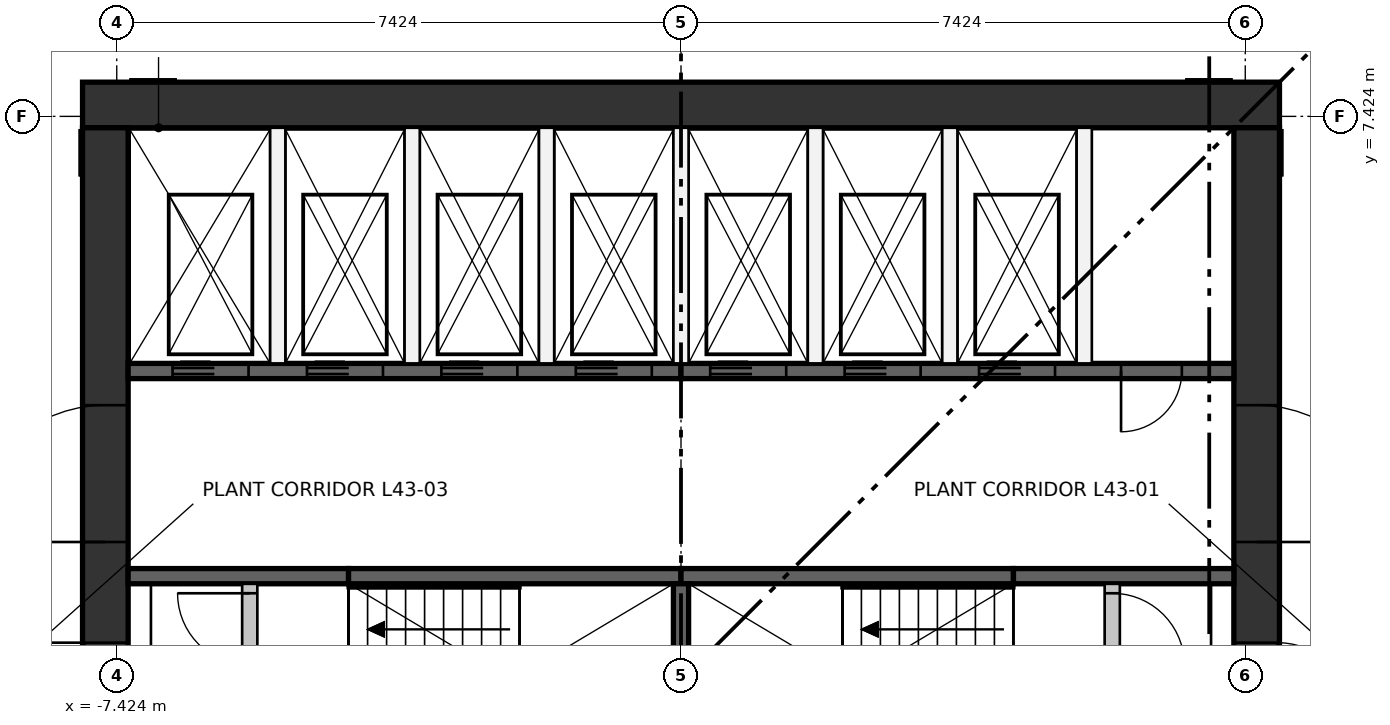
"""IFC4 building model, lengths in metres.
Left out: names, types, materials, properties, quantities, classifications, styles, units other than length and angle.
Written with IfcOpenShell. Run it as: python <this file> out.ifc"""

import sys

from ifc_helpers import new_model, si_unit, direction, frame, frame_2d, origin, place, context, subcontext, project, spatial, rectangle, extrude, element, fill, save


model = new_model("IFC4")
c1 = context("Model", 3, precision=1e-05, world=origin(), true_north=direction((0.0, 1.0)))
c2 = subcontext(c1, "Body", "Model", "MODEL_VIEW")
j1 = project(units=[si_unit("LENGTHUNIT", "METRE"), si_unit("PLANEANGLEUNIT", "RADIAN")], contexts=[c1])
p1 = place(None, origin())
s1 = spatial("IfcSite", under=j1, at=p1, CompositionType="ELEMENT")
p2 = place(p1, origin())
s2 = spatial("IfcBuilding", under=s1, at=p2, CompositionType="ELEMENT")
p3 = place(p2, frame((0.0, 0.0, 161.15)))
s3 = spatial("IfcBuildingStorey", under=s2, at=p3, CompositionType="ELEMENT", Elevation=161.15)
p4 = place(p3, frame((-7.874, 7.574, 0.0), z_axis=(0.0, 0.0, 1.0), x_axis=(1.0, 0.0, 0.0)))
e1 = element("IfcWall", 1, at=p4, inside=s3, PredefinedType="SHEAR", context=c2, shape_type="SweptSolid", body=[
    extrude(rectangle(XDim=15.748, YDim=0.6, at=frame_2d((7.874, 0.0))), origin(), (0.0, 0.0, 1.0), 6.4),
])
p5 = place(p3, frame((-7.574, -7.274, 0.0), z_axis=(0.0, 0.0, 1.0), x_axis=(0.0, 1.0, 0.0)))
e2 = element("IfcWall", 2, at=p5, inside=s3, PredefinedType="SHEAR", context=c2, shape_type="SweptSolid", body=[
    extrude(rectangle(XDim=14.548, YDim=0.6, at=frame_2d((7.274, 0.0))), origin(), (0.0, 0.0, 1.0), 6.4),
])
p6 = place(p5, frame((6.774, 0.0, 0.0)))
e3 = element("IfcOpeningElement", 3, at=p6, cuts=e2, PredefinedType="OPENING", context=c2, shape_type="SweptSolid", body=[
    extrude(rectangle(XDim=1.0, YDim=2.1, at=frame_2d((0.5, 1.05))), frame((0.0, 0.31, 0.0), z_axis=(0.0, -1.0, 0.0), x_axis=(1.0, 0.0, 0.0)), (0.0, 0.0, 1.0), 0.62),
])
p7 = place(p5, frame((3.649, 0.0, 0.0)))
e4 = element("IfcOpeningElement", 4, at=p7, cuts=e2, PredefinedType="OPENING", context=c2, shape_type="SweptSolid", body=[
    extrude(rectangle(XDim=1.8, YDim=2.1, at=frame_2d((0.9, 1.05))), frame((0.0, 0.31, 0.0), z_axis=(0.0, -1.0, 0.0), x_axis=(1.0, 0.0, 0.0)), (0.0, 0.0, 1.0), 0.62),
])
p8 = place(p5, frame((9.098, 0.0, 0.0)))
e5 = element("IfcOpeningElement", 5, at=p8, cuts=e2, PredefinedType="OPENING", context=c2, shape_type="SweptSolid", body=[
    extrude(rectangle(XDim=1.8, YDim=2.1, at=frame_2d((0.9, 1.05))), frame((0.0, 0.31, 0.0), z_axis=(0.0, -1.0, 0.0), x_axis=(1.0, 0.0, 0.0)), (0.0, 0.0, 1.0), 0.62),
])
p9 = place(p3, frame((7.574, -7.274, 0.0), z_axis=(0.0, 0.0, 1.0), x_axis=(0.0, 1.0, 0.0)))
e6 = element("IfcWall", 6, at=p9, inside=s3, PredefinedType="SHEAR", context=c2, shape_type="SweptSolid", body=[
    extrude(rectangle(XDim=14.548, YDim=0.6, at=frame_2d((7.274, 0.0))), origin(), (0.0, 0.0, 1.0), 6.4),
])
p10 = place(p9, frame((6.774, 0.0, 0.0)))
e7 = element("IfcOpeningElement", 7, at=p10, cuts=e6, PredefinedType="OPENING", context=c2, shape_type="SweptSolid", body=[
    extrude(rectangle(XDim=1.0, YDim=2.1, at=frame_2d((0.5, 1.05))), frame((0.0, 0.31, 0.0), z_axis=(0.0, -1.0, 0.0), x_axis=(1.0, 0.0, 0.0)), (0.0, 0.0, 1.0), 0.62),
])
p11 = place(p9, frame((3.649, 0.0, 0.0)))
e8 = element("IfcOpeningElement", 8, at=p11, cuts=e6, PredefinedType="OPENING", context=c2, shape_type="SweptSolid", body=[
    extrude(rectangle(XDim=1.8, YDim=2.1, at=frame_2d((0.9, 1.05))), frame((0.0, 0.31, 0.0), z_axis=(0.0, -1.0, 0.0), x_axis=(1.0, 0.0, 0.0)), (0.0, 0.0, 1.0), 0.62),
])
p12 = place(p9, frame((9.098, 0.0, 0.0)))
e9 = element("IfcOpeningElement", 9, at=p12, cuts=e6, PredefinedType="OPENING", context=c2, shape_type="SweptSolid", body=[
    extrude(rectangle(XDim=1.8, YDim=2.1, at=frame_2d((0.9, 1.05))), frame((0.0, 0.31, 0.0), z_axis=(0.0, -1.0, 0.0), x_axis=(1.0, 0.0, 0.0)), (0.0, 0.0, 1.0), 0.62),
])
p13 = place(p3, frame((-7.274, 4.074, 0.0), z_axis=(0.0, 0.0, 1.0), x_axis=(1.0, 0.0, 0.0)))
e10 = element("IfcWall", 10, at=p13, inside=s3, PredefinedType="SHEAR", context=c2, shape_type="SweptSolid", body=[
    extrude(rectangle(XDim=7.274, YDim=0.2, at=frame_2d((3.637, 0.0))), origin(), (0.0, 0.0, 1.0), 6.05),
])
p14 = place(p13, frame((0.584, 0.0, 0.0)))
e11 = element("IfcOpeningElement", 11, at=p14, cuts=e10, PredefinedType="OPENING", context=c2, shape_type="SweptSolid", body=[
    extrude(rectangle(XDim=1.0, YDim=2.1, at=frame_2d((0.5, 1.05))), frame((0.0, 0.11, 0.0), z_axis=(0.0, -1.0, 0.0), x_axis=(1.0, 0.0, 0.0)), (0.0, 0.0, 1.0), 0.22),
])
p15 = place(p13, frame((2.353, 0.0, 0.0)))
e12 = element("IfcOpeningElement", 12, at=p15, cuts=e10, PredefinedType="OPENING", context=c2, shape_type="SweptSolid", body=[
    extrude(rectangle(XDim=1.0, YDim=2.1, at=frame_2d((0.5, 1.05))), frame((0.0, 0.11, 0.0), z_axis=(0.0, -1.0, 0.0), x_axis=(1.0, 0.0, 0.0)), (0.0, 0.0, 1.0), 0.22),
])
p16 = place(p13, frame((4.121, 0.0, 0.0)))
e13 = element("IfcOpeningElement", 13, at=p16, cuts=e10, PredefinedType="OPENING", context=c2, shape_type="SweptSolid", body=[
    extrude(rectangle(XDim=1.0, YDim=2.1, at=frame_2d((0.5, 1.05))), frame((0.0, 0.11, 0.0), z_axis=(0.0, -1.0, 0.0), x_axis=(1.0, 0.0, 0.0)), (0.0, 0.0, 1.0), 0.22),
])
p17 = place(p13, frame((5.89, 0.0, 0.0)))
e14 = element("IfcOpeningElement", 14, at=p17, cuts=e10, PredefinedType="OPENING", context=c2, shape_type="SweptSolid", body=[
    extrude(rectangle(XDim=1.0, YDim=2.1, at=frame_2d((0.5, 1.05))), frame((0.0, 0.11, 0.0), z_axis=(0.0, -1.0, 0.0), x_axis=(1.0, 0.0, 0.0)), (0.0, 0.0, 1.0), 0.22),
])
p18 = place(p3, frame((0.0, 4.074, 0.0), z_axis=(0.0, 0.0, 1.0), x_axis=(1.0, 0.0, 0.0)))
e15 = element("IfcWall", 15, at=p18, inside=s3, PredefinedType="SHEAR", context=c2, shape_type="SweptSolid", body=[
    extrude(rectangle(XDim=7.274, YDim=0.2, at=frame_2d((3.637, 0.0))), origin(), (0.0, 0.0, 1.0), 6.05),
])
p19 = place(p18, frame((0.384, 0.0, 0.0)))
e16 = element("IfcOpeningElement", 16, at=p19, cuts=e15, PredefinedType="OPENING", context=c2, shape_type="SweptSolid", body=[
    extrude(rectangle(XDim=1.0, YDim=2.1, at=frame_2d((0.5, 1.05))), frame((0.0, 0.11, 0.0), z_axis=(0.0, -1.0, 0.0), x_axis=(1.0, 0.0, 0.0)), (0.0, 0.0, 1.0), 0.22),
])
p20 = place(p18, frame((2.153, 0.0, 0.0)))
e17 = element("IfcOpeningElement", 17, at=p20, cuts=e15, PredefinedType="OPENING", context=c2, shape_type="SweptSolid", body=[
    extrude(rectangle(XDim=1.0, YDim=2.1, at=frame_2d((0.5, 1.05))), frame((0.0, 0.11, 0.0), z_axis=(0.0, -1.0, 0.0), x_axis=(1.0, 0.0, 0.0)), (0.0, 0.0, 1.0), 0.22),
])
p21 = place(p18, frame((3.921, 0.0, 0.0)))
e18 = element("IfcOpeningElement", 18, at=p21, cuts=e15, PredefinedType="OPENING", context=c2, shape_type="SweptSolid", body=[
    extrude(rectangle(XDim=1.0, YDim=2.1, at=frame_2d((0.5, 1.05))), frame((0.0, 0.11, 0.0), z_axis=(0.0, -1.0, 0.0), x_axis=(1.0, 0.0, 0.0)), (0.0, 0.0, 1.0), 0.22),
])
p22 = place(p18, frame((5.79, 0.0, 0.0)))
e19 = element("IfcOpeningElement", 19, at=p22, cuts=e15, PredefinedType="OPENING", context=c2, shape_type="SweptSolid", body=[
    extrude(rectangle(XDim=0.8, YDim=2.1, at=frame_2d((0.4, 1.05))), frame((0.0, 0.11, 0.0), z_axis=(0.0, -1.0, 0.0), x_axis=(1.0, 0.0, 0.0)), (0.0, 0.0, 1.0), 0.22),
])
p23 = place(p3, frame((-7.274, 1.375, 0.0), z_axis=(0.0, 0.0, 1.0), x_axis=(1.0, 0.0, 0.0)))
e20 = element("IfcWall", 20, at=p23, inside=s3, PredefinedType="SHEAR", context=c2, shape_type="SweptSolid", body=[
    extrude(rectangle(XDim=2.9, YDim=0.2, at=frame_2d((1.45, 0.0))), origin(), (0.0, 0.0, 1.0), 6.05),
])
for number, where, z_axis, x_axis in (
    (21, (-4.374, 1.375, 0.0), (0.0, 0.0, 1.0), (1.0, 0.0, 0.0)),
    (22, (0.0, 1.375, 0.0), (0.0, 0.0, 1.0), (1.0, 0.0, 0.0)),
):
    element("IfcWall", number, at=place(p3, frame(where, z_axis=z_axis, x_axis=x_axis)), inside=s3, PredefinedType="SHEAR", context=c2, shape_type="SweptSolid", body=[
        extrude(rectangle(XDim=4.374, YDim=0.2, at=frame_2d((2.187, 0.0))), origin(), (0.0, 0.0, 1.0), 6.05),
    ])
p24 = place(p3, frame((4.374, 1.375, 0.0), z_axis=(0.0, 0.0, 1.0), x_axis=(1.0, 0.0, 0.0)))
e23 = element("IfcWall", 23, at=p24, inside=s3, PredefinedType="SHEAR", context=c2, shape_type="SweptSolid", body=[
    extrude(rectangle(XDim=2.9, YDim=0.2, at=frame_2d((1.45, 0.0))), origin(), (0.0, 0.0, 1.0), 6.05),
])
p25 = place(p3, frame((0.0, -1.275, 0.0), z_axis=(0.0, 0.0, 1.0), x_axis=(0.0, 1.0, 0.0)))
e24 = element("IfcWall", 24, at=p25, inside=s3, PredefinedType="SHEAR", context=c2, shape_type="SweptSolid", body=[
    extrude(rectangle(XDim=2.55, YDim=0.2, at=frame_2d((1.275, 0.0))), origin(), (0.0, 0.0, 1.0), 6.05),
])
for number, where, z_axis, x_axis in (
    (25, (-5.305, 4.174, 0.0), (0.0, 0.0, 1.0), (0.0, 1.0, 0.0)),
    (26, (-3.537, 4.174, 0.0), (0.0, 0.0, 1.0), (0.0, 1.0, 0.0)),
    (27, (-1.769, 4.174, 0.0), (0.0, 0.0, 1.0), (0.0, 1.0, 0.0)),
    (28, (0.0, 4.174, 0.0), (0.0, 0.0, 1.0), (0.0, 1.0, 0.0)),
    (29, (1.769, 4.174, 0.0), (0.0, 0.0, 1.0), (0.0, 1.0, 0.0)),
    (30, (3.537, 4.174, 0.0), (0.0, 0.0, 1.0), (0.0, 1.0, 0.0)),
    (31, (5.305, 4.174, 0.0), (0.0, 0.0, 1.0), (0.0, 1.0, 0.0)),
):
    element("IfcWall", number, at=place(p3, frame(where, z_axis=z_axis, x_axis=x_axis)), inside=s3, PredefinedType="PARTITIONING", context=c2, shape_type="SweptSolid", body=[
        extrude(rectangle(XDim=3.1, YDim=0.2, at=frame_2d((1.55, 0.0))), origin(), (0.0, 0.0, 1.0), 6.05),
    ])
p26 = place(p3, frame((-5.674, -1.275, 0.0), z_axis=(0.0, 0.0, 1.0), x_axis=(0.0, 1.0, 0.0)))
e32 = element("IfcWall", 32, at=p26, inside=s3, PredefinedType="PARTITIONING", context=c2, shape_type="SweptSolid", body=[
    extrude(rectangle(XDim=2.55, YDim=0.2, at=frame_2d((1.275, 0.0))), origin(), (0.0, 0.0, 1.0), 6.05),
])
p27 = place(p26, frame((0.125, 0.0, 0.0)))
e33 = element("IfcOpeningElement", 33, at=p27, cuts=e32, PredefinedType="OPENING", context=c2, shape_type="SweptSolid", body=[
    extrude(rectangle(XDim=0.95, YDim=2.1, at=frame_2d((0.475, 1.05))), frame((0.0, 0.11, 0.0), z_axis=(0.0, -1.0, 0.0), x_axis=(1.0, 0.0, 0.0)), (0.0, 0.0, 1.0), 0.22),
])
p28 = place(p26, frame((1.475, 0.0, 0.0)))
e34 = element("IfcOpeningElement", 34, at=p28, cuts=e32, PredefinedType="OPENING", context=c2, shape_type="SweptSolid", body=[
    extrude(rectangle(XDim=0.95, YDim=2.1, at=frame_2d((0.475, 1.05))), frame((0.0, 0.11, 0.0), z_axis=(0.0, -1.0, 0.0), x_axis=(1.0, 0.0, 0.0)), (0.0, 0.0, 1.0), 0.22),
])
p29 = place(p3, frame((5.674, -1.275, 0.0), z_axis=(0.0, 0.0, 1.0), x_axis=(0.0, 1.0, 0.0)))
e35 = element("IfcWall", 35, at=p29, inside=s3, PredefinedType="PARTITIONING", context=c2, shape_type="SweptSolid", body=[
    extrude(rectangle(XDim=2.55, YDim=0.2, at=frame_2d((1.275, 0.0))), origin(), (0.0, 0.0, 1.0), 6.05),
])
p30 = place(p29, frame((0.125, 0.0, 0.0)))
e36 = element("IfcOpeningElement", 36, at=p30, cuts=e35, PredefinedType="OPENING", context=c2, shape_type="SweptSolid", body=[
    extrude(rectangle(XDim=0.95, YDim=2.1, at=frame_2d((0.475, 1.05))), frame((0.0, 0.11, 0.0), z_axis=(0.0, -1.0, 0.0), x_axis=(1.0, 0.0, 0.0)), (0.0, 0.0, 1.0), 0.22),
])
p31 = place(p29, frame((1.475, 0.0, 0.0)))
e37 = element("IfcOpeningElement", 37, at=p31, cuts=e35, PredefinedType="OPENING", context=c2, shape_type="SweptSolid", body=[
    extrude(rectangle(XDim=0.95, YDim=2.1, at=frame_2d((0.475, 1.05))), frame((0.0, 0.11, 0.0), z_axis=(0.0, -1.0, 0.0), x_axis=(1.0, 0.0, 0.0)), (0.0, 0.0, 1.0), 0.22),
])
p32 = place(p14, frame((1.0, 0.0, 0.0), z_axis=(0.0, 0.0, 1.0), x_axis=(-1.0, 0.0, 0.0)))
e38 = element("IfcDoor", 38, at=p32, inside=s3, OperationType="DOUBLE_DOOR_SLIDING", PredefinedType="DOOR", context=c2, shape_type="SweptSolid", body=[
    extrude(rectangle(XDim=1.0, YDim=2.1, at=frame_2d((0.5, 1.05))), frame((0.0, 0.025, 0.0), z_axis=(0.0, -1.0, 0.0), x_axis=(1.0, 0.0, 0.0)), (0.0, 0.0, 1.0), 0.05),
])
fill(e11, e38)
p33 = place(p15, frame((1.0, 0.0, 0.0), z_axis=(0.0, 0.0, 1.0), x_axis=(-1.0, 0.0, 0.0)))
e39 = element("IfcDoor", 39, at=p33, inside=s3, OperationType="DOUBLE_DOOR_SLIDING", PredefinedType="DOOR", context=c2, shape_type="SweptSolid", body=[
    extrude(rectangle(XDim=1.0, YDim=2.1, at=frame_2d((0.5, 1.05))), frame((0.0, 0.025, 0.0), z_axis=(0.0, -1.0, 0.0), x_axis=(1.0, 0.0, 0.0)), (0.0, 0.0, 1.0), 0.05),
])
fill(e12, e39)
p34 = place(p16, frame((1.0, 0.0, 0.0), z_axis=(0.0, 0.0, 1.0), x_axis=(-1.0, 0.0, 0.0)))
e40 = element("IfcDoor", 40, at=p34, inside=s3, OperationType="DOUBLE_DOOR_SLIDING", PredefinedType="DOOR", context=c2, shape_type="SweptSolid", body=[
    extrude(rectangle(XDim=1.0, YDim=2.1, at=frame_2d((0.5, 1.05))), frame((0.0, 0.025, 0.0), z_axis=(0.0, -1.0, 0.0), x_axis=(1.0, 0.0, 0.0)), (0.0, 0.0, 1.0), 0.05),
])
fill(e13, e40)
p35 = place(p17, frame((1.0, 0.0, 0.0), z_axis=(0.0, 0.0, 1.0), x_axis=(-1.0, 0.0, 0.0)))
e41 = element("IfcDoor", 41, at=p35, inside=s3, OperationType="DOUBLE_DOOR_SLIDING", PredefinedType="DOOR", context=c2, shape_type="SweptSolid", body=[
    extrude(rectangle(XDim=1.0, YDim=2.1, at=frame_2d((0.5, 1.05))), frame((0.0, 0.025, 0.0), z_axis=(0.0, -1.0, 0.0), x_axis=(1.0, 0.0, 0.0)), (0.0, 0.0, 1.0), 0.05),
])
fill(e14, e41)
p36 = place(p19, frame((1.0, 0.0, 0.0), z_axis=(0.0, 0.0, 1.0), x_axis=(-1.0, 0.0, 0.0)))
e42 = element("IfcDoor", 42, at=p36, inside=s3, OperationType="DOUBLE_DOOR_SLIDING", PredefinedType="DOOR", context=c2, shape_type="SweptSolid", body=[
    extrude(rectangle(XDim=1.0, YDim=2.1, at=frame_2d((0.5, 1.05))), frame((0.0, 0.025, 0.0), z_axis=(0.0, -1.0, 0.0), x_axis=(1.0, 0.0, 0.0)), (0.0, 0.0, 1.0), 0.05),
])
fill(e16, e42)
p37 = place(p20, frame((1.0, 0.0, 0.0), z_axis=(0.0, 0.0, 1.0), x_axis=(-1.0, 0.0, 0.0)))
e43 = element("IfcDoor", 43, at=p37, inside=s3, OperationType="DOUBLE_DOOR_SLIDING", PredefinedType="DOOR", context=c2, shape_type="SweptSolid", body=[
    extrude(rectangle(XDim=1.0, YDim=2.1, at=frame_2d((0.5, 1.05))), frame((0.0, 0.025, 0.0), z_axis=(0.0, -1.0, 0.0), x_axis=(1.0, 0.0, 0.0)), (0.0, 0.0, 1.0), 0.05),
])
fill(e17, e43)
p38 = place(p21, frame((1.0, 0.0, 0.0), z_axis=(0.0, 0.0, 1.0), x_axis=(-1.0, 0.0, 0.0)))
e44 = element("IfcDoor", 44, at=p38, inside=s3, OperationType="DOUBLE_DOOR_SLIDING", PredefinedType="DOOR", context=c2, shape_type="SweptSolid", body=[
    extrude(rectangle(XDim=1.0, YDim=2.1, at=frame_2d((0.5, 1.05))), frame((0.0, 0.025, 0.0), z_axis=(0.0, -1.0, 0.0), x_axis=(1.0, 0.0, 0.0)), (0.0, 0.0, 1.0), 0.05),
])
fill(e18, e44)
p39 = place(p28, origin())
e45 = element("IfcDoor", 45, at=p39, inside=s3, OperationType="SINGLE_SWING_RIGHT", PredefinedType="DOOR", context=c2, shape_type="SweptSolid", body=[
    extrude(rectangle(XDim=0.95, YDim=2.1, at=frame_2d((0.475, 1.05))), frame((0.0, 0.025, 0.0), z_axis=(0.0, -1.0, 0.0), x_axis=(1.0, 0.0, 0.0)), (0.0, 0.0, 1.0), 0.05),
])
fill(e34, e45)
p40 = place(p31, frame((0.95, 0.0, 0.0), z_axis=(0.0, 0.0, 1.0), x_axis=(-1.0, 0.0, 0.0)))
e46 = element("IfcDoor", 46, at=p40, inside=s3, OperationType="SINGLE_SWING_LEFT", PredefinedType="DOOR", context=c2, shape_type="SweptSolid", body=[
    extrude(rectangle(XDim=0.95, YDim=2.1, at=frame_2d((0.475, 1.05))), frame((0.0, 0.025, 0.0), z_axis=(0.0, -1.0, 0.0), x_axis=(1.0, 0.0, 0.0)), (0.0, 0.0, 1.0), 0.05),
])
fill(e37, e46)
p41 = place(p22, frame((0.8, 0.0, 0.0), z_axis=(0.0, 0.0, 1.0), x_axis=(-1.0, 0.0, 0.0)))
e47 = element("IfcDoor", 47, at=p41, inside=s3, OperationType="SINGLE_SWING_LEFT", PredefinedType="DOOR", context=c2, shape_type="SweptSolid", body=[
    extrude(rectangle(XDim=0.8, YDim=2.1, at=frame_2d((0.4, 1.05))), frame((0.0, 0.025, 0.0), z_axis=(0.0, -1.0, 0.0), x_axis=(1.0, 0.0, 0.0)), (0.0, 0.0, 1.0), 0.05),
])
fill(e19, e47)
p42 = place(p6, origin())
e48 = element("IfcDoor", 48, at=p42, inside=s3, OperationType="SINGLE_SWING_RIGHT", PredefinedType="DOOR", context=c2, shape_type="SweptSolid", body=[
    extrude(rectangle(XDim=1.0, YDim=2.1, at=frame_2d((0.5, 1.05))), frame((0.0, 0.3, 0.0), z_axis=(0.0, -1.0, 0.0), x_axis=(1.0, 0.0, 0.0)), (0.0, 0.0, 1.0), 0.05),
])
fill(e3, e48)
p43 = place(p8, origin())
e49 = element("IfcDoor", 49, at=p43, inside=s3, OperationType="DOUBLE_DOOR_SINGLE_SWING", PredefinedType="DOOR", context=c2, shape_type="SweptSolid", body=[
    extrude(rectangle(XDim=1.8, YDim=2.1, at=frame_2d((0.9, 1.05))), frame((0.0, 0.025, 0.0), z_axis=(0.0, -1.0, 0.0), x_axis=(1.0, 0.0, 0.0)), (0.0, 0.0, 1.0), 0.05),
])
fill(e5, e49)
p44 = place(p10, frame((1.0, 0.0, 0.0), z_axis=(0.0, 0.0, 1.0), x_axis=(-1.0, 0.0, 0.0)))
e50 = element("IfcDoor", 50, at=p44, inside=s3, OperationType="SINGLE_SWING_LEFT", PredefinedType="DOOR", context=c2, shape_type="SweptSolid", body=[
    extrude(rectangle(XDim=1.0, YDim=2.1, at=frame_2d((0.5, 1.05))), frame((0.0, 0.3, 0.0), z_axis=(0.0, -1.0, 0.0), x_axis=(1.0, 0.0, 0.0)), (0.0, 0.0, 1.0), 0.05),
])
fill(e7, e50)
p45 = place(p12, frame((1.8, 0.0, 0.0), z_axis=(0.0, 0.0, 1.0), x_axis=(-1.0, 0.0, 0.0)))
e51 = element("IfcDoor", 51, at=p45, inside=s3, OperationType="DOUBLE_DOOR_SINGLE_SWING", PredefinedType="DOOR", context=c2, shape_type="SweptSolid", body=[
    extrude(rectangle(XDim=1.8, YDim=2.1, at=frame_2d((0.9, 1.05))), frame((0.0, 0.025, 0.0), z_axis=(0.0, -1.0, 0.0), x_axis=(1.0, 0.0, 0.0)), (0.0, 0.0, 1.0), 0.05),
])
fill(e9, e51)
save(model, sys.argv[1])
